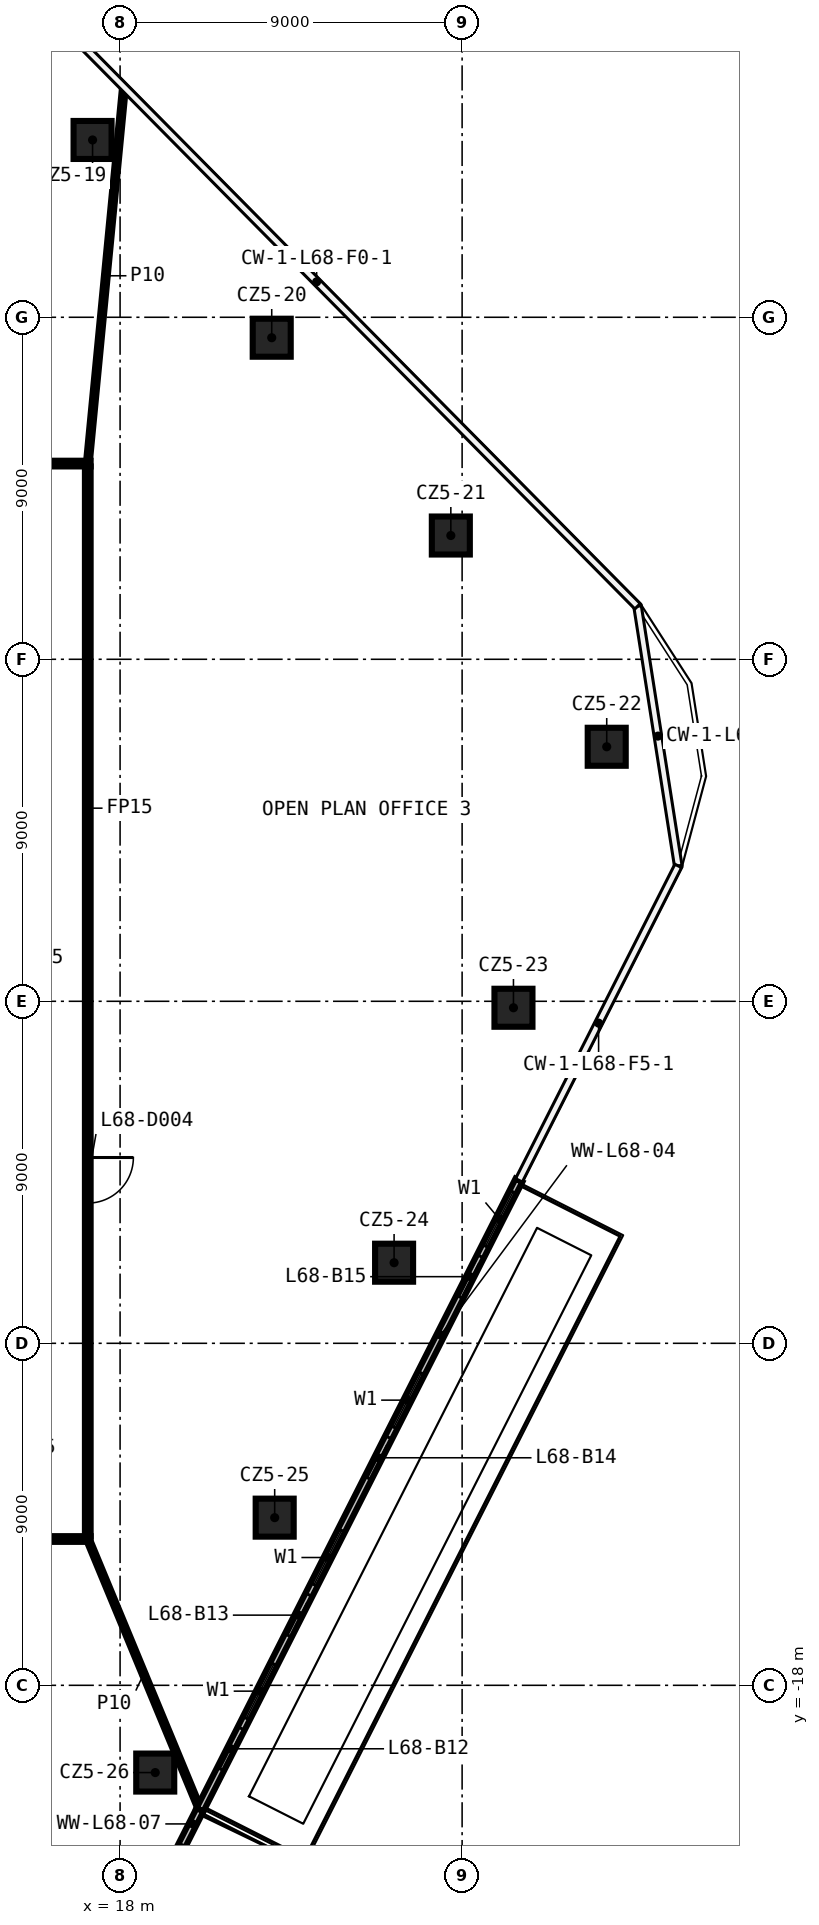
"""IFC4 building model, lengths in metres.
Left out: names, types, materials, properties, quantities, classifications, styles, units other than length and angle.
Written with IfcOpenShell. Run it as: python <this file> out.ifc"""

import sys

from ifc_helpers import new_model, si_unit, direction, frame, frame_2d, origin, origin_2d, place, context, subcontext, project, spatial, rectangle, extrude, element, fill, save


model = new_model("IFC4")
c1 = context("Model", 3, precision=1e-05, world=origin(), true_north=direction((0.0, 1.0)))
c2 = subcontext(c1, "Body", "Model", "MODEL_VIEW")
j1 = project(units=[si_unit("LENGTHUNIT", "METRE"), si_unit("PLANEANGLEUNIT", "RADIAN")], contexts=[c1])
p1 = place(None, origin())
s1 = spatial("IfcSite", under=j1, at=p1, CompositionType="ELEMENT")
p2 = place(p1, origin())
s2 = spatial("IfcBuilding", under=s1, at=p2, CompositionType="ELEMENT")
p3 = place(p2, frame((0.0, 0.0, 319.4)))
s3 = spatial("IfcBuildingStorey", under=s2, at=p3, CompositionType="ELEMENT", Elevation=319.4)
for number, where, z_axis, x_axis in (
    (1, (17.276, 22.666, 0.0), (0.0, 0.0, 1.0), (1.0, 0.0, 0.0)),
    (2, (21.99, 17.462, 0.0), (0.0, 0.0, 1.0), (1.0, 0.0, 0.0)),
    (3, (26.703, 12.257, 0.0), (0.0, 0.0, 1.0), (1.0, 0.0, 0.0)),
    (4, (30.805, 6.698, 0.0), (0.0, 0.0, 1.0), (1.0, 0.0, 0.0)),
    (5, (28.351, -0.17, 0.0), (0.0, 0.0, 1.0), (1.0, 0.0, 0.0)),
    (6, (25.21, -6.879, 0.0), (0.0, 0.0, 1.0), (1.0, 0.0, 0.0)),
    (7, (22.068, -13.588, 0.0), (0.0, 0.0, 1.0), (1.0, 0.0, 0.0)),
    (8, (18.925, -20.296, 0.0), (0.0, 0.0, 1.0), (1.0, 0.0, 0.0)),
):
    element("IfcColumn", number, at=place(p3, frame(where, z_axis=z_axis, x_axis=x_axis)), inside=s3, PredefinedType="COLUMN", context=c2, shape_type="SweptSolid", body=[
        extrude(rectangle(XDim=1.0, YDim=1.0, at=origin_2d()), origin(), (0.0, 0.0, 1.0), 3.82),
    ])
p4 = place(p3, frame((17.225, -14.15, 0.0), z_axis=(0.0, 0.0, 1.0), x_axis=(-1.0, 0.0, 0.0)))
e9 = element("IfcWall", 9, at=p4, inside=s3, PredefinedType="PARTITIONING", context=c2, shape_type="SweptSolid", body=[
    extrude(rectangle(XDim=34.45, YDim=0.15, at=frame_2d((17.225, 0.0))), origin(), (0.0, 0.0, 1.0), 3.82),
])
p5 = place(p4, frame((17.711, 0.0, 0.0)))
e10 = element("IfcOpeningElement", 10, at=p5, cuts=e9, PredefinedType="OPENING", context=c2, shape_type="SweptSolid", body=[
    extrude(rectangle(XDim=1.2, YDim=2.1, at=frame_2d((0.6, 1.05))), frame((0.0, 0.085, 0.0), z_axis=(0.0, -1.0, 0.0), x_axis=(1.0, 0.0, 0.0)), (0.0, 0.0, 1.0), 0.17),
])
p6 = place(p4, frame((4.094, 0.0, 0.0)))
e11 = element("IfcOpeningElement", 11, at=p6, cuts=e9, PredefinedType="OPENING", context=c2, shape_type="SweptSolid", body=[
    extrude(rectangle(XDim=1.2, YDim=2.1, at=frame_2d((0.6, 1.05))), frame((0.0, 0.085, 0.0), z_axis=(0.0, -1.0, 0.0), x_axis=(1.0, 0.0, 0.0)), (0.0, 0.0, 1.0), 0.17),
])
p7 = place(p3, frame((-17.225, 14.15, 0.0), z_axis=(0.0, 0.0, 1.0), x_axis=(1.0, 0.0, 0.0)))
e12 = element("IfcWall", 12, at=p7, inside=s3, PredefinedType="PARTITIONING", context=c2, shape_type="SweptSolid", body=[
    extrude(rectangle(XDim=34.45, YDim=0.15, at=frame_2d((17.225, 0.0))), origin(), (0.0, 0.0, 1.0), 3.82),
])
p8 = place(p7, frame((17.706, 0.0, 0.0)))
e13 = element("IfcOpeningElement", 13, at=p8, cuts=e12, PredefinedType="OPENING", context=c2, shape_type="SweptSolid", body=[
    extrude(rectangle(XDim=1.2, YDim=2.1, at=frame_2d((0.6, 1.05))), frame((0.0, 0.085, 0.0), z_axis=(0.0, -1.0, 0.0), x_axis=(1.0, 0.0, 0.0)), (0.0, 0.0, 1.0), 0.17),
])
p9 = place(p3, frame((17.15, 14.15, 0.0), z_axis=(0.0, 0.0, 1.0), x_axis=(0.095686172631, 0.995411551253, 0.0)))
e14 = element("IfcWall", 14, at=p9, inside=s3, PredefinedType="PARTITIONING", context=c2, shape_type="SweptSolid", body=[
    extrude(rectangle(XDim=9.93, YDim=0.1, at=frame_2d((4.965, 0.0))), origin(), (0.0, 0.0, 1.0), 3.82),
])
p10 = place(p3, frame((17.15, 14.075, 0.0), z_axis=(0.0, 0.0, 1.0), x_axis=(0.0, -1.0, 0.0)))
e15 = element("IfcWall", 15, at=p10, inside=s3, PredefinedType="PARTITIONING", context=c2, shape_type="SweptSolid", body=[
    extrude(rectangle(XDim=28.15, YDim=0.15, at=frame_2d((14.075, 0.0))), origin(), (0.0, 0.0, 1.0), 3.82),
])
p11 = place(p10, frame((18.186, 0.0, 0.0)))
e16 = element("IfcOpeningElement", 16, at=p11, cuts=e15, PredefinedType="OPENING", context=c2, shape_type="SweptSolid", body=[
    extrude(rectangle(XDim=1.2, YDim=2.1, at=frame_2d((0.6, 1.05))), frame((0.0, 0.085, 0.0), z_axis=(0.0, -1.0, 0.0), x_axis=(1.0, 0.0, 0.0)), (0.0, 0.0, 1.0), 0.17),
])
p12 = place(p3, frame((17.15, -14.15, 0.0), z_axis=(0.0, 0.0, 1.0), x_axis=(0.382693080748, -0.923875535961, 0.0)))
e17 = element("IfcWall", 17, at=p12, inside=s3, PredefinedType="PARTITIONING", context=c2, shape_type="SweptSolid", body=[
    extrude(rectangle(XDim=7.687, YDim=0.1, at=frame_2d((3.843, 0.0))), origin(), (0.0, 0.0, 1.0), 3.82),
])
p13 = place(p3, frame((20.102, -21.276, 0.0), z_axis=(0.0, 0.0, 1.0), x_axis=(0.451966467013, 0.892034927957, 0.0)))
e18 = element("IfcWall", 18, at=p13, inside=s3, PredefinedType="SOLIDWALL", context=c2, shape_type="SweptSolid", body=[
    extrude(rectangle(XDim=18.57, YDim=0.2, at=frame_2d((9.285, 0.0))), origin(), (0.0, 0.0, 1.0), 3.82),
])
p14 = place(p13, frame((2.7, 0.0, 0.6)))
e19 = element("IfcOpeningElement", 19, at=p14, cuts=e18, PredefinedType="OPENING", context=c2, shape_type="SweptSolid", body=[
    extrude(rectangle(XDim=1.6, YDim=2.4, at=frame_2d((0.8, 1.2))), frame((0.0, 0.11, 0.0), z_axis=(0.0, -1.0, 0.0), x_axis=(1.0, 0.0, 0.0)), (0.0, 0.0, 1.0), 0.22),
])
p15 = place(p13, frame((1.2, 0.0, 0.0)))
e20 = element("IfcOpeningElement", 20, at=p15, cuts=e18, PredefinedType="OPENING", context=c2, shape_type="SweptSolid", body=[
    extrude(rectangle(XDim=1.2, YDim=2.4, at=frame_2d((0.6, 1.2))), frame((0.0, 0.11, 0.0), z_axis=(0.0, -1.0, 0.0), x_axis=(1.0, 0.0, 0.0)), (0.0, 0.0, 1.0), 0.22),
])
p16 = place(p13, frame((6.643, 0.0, 0.6)))
e21 = element("IfcOpeningElement", 21, at=p16, cuts=e18, PredefinedType="OPENING", context=c2, shape_type="SweptSolid", body=[
    extrude(rectangle(XDim=1.6, YDim=2.4, at=frame_2d((0.8, 1.2))), frame((0.0, 0.11, 0.0), z_axis=(0.0, -1.0, 0.0), x_axis=(1.0, 0.0, 0.0)), (0.0, 0.0, 1.0), 0.22),
])
p17 = place(p13, frame((5.143, 0.0, 0.0)))
e22 = element("IfcOpeningElement", 22, at=p17, cuts=e18, PredefinedType="OPENING", context=c2, shape_type="SweptSolid", body=[
    extrude(rectangle(XDim=1.2, YDim=2.4, at=frame_2d((0.6, 1.2))), frame((0.0, 0.11, 0.0), z_axis=(0.0, -1.0, 0.0), x_axis=(1.0, 0.0, 0.0)), (0.0, 0.0, 1.0), 0.22),
])
p18 = place(p13, frame((11.285, 0.0, 0.6)))
e23 = element("IfcOpeningElement", 23, at=p18, cuts=e18, PredefinedType="OPENING", context=c2, shape_type="SweptSolid", body=[
    extrude(rectangle(XDim=1.6, YDim=2.4, at=frame_2d((0.8, 1.2))), frame((0.0, 0.11, 0.0), z_axis=(0.0, -1.0, 0.0), x_axis=(1.0, 0.0, 0.0)), (0.0, 0.0, 1.0), 0.22),
])
p19 = place(p13, frame((9.785, 0.0, 0.0)))
e24 = element("IfcOpeningElement", 24, at=p19, cuts=e18, PredefinedType="OPENING", context=c2, shape_type="SweptSolid", body=[
    extrude(rectangle(XDim=1.2, YDim=2.4, at=frame_2d((0.6, 1.2))), frame((0.0, 0.11, 0.0), z_axis=(0.0, -1.0, 0.0), x_axis=(1.0, 0.0, 0.0)), (0.0, 0.0, 1.0), 0.22),
])
p20 = place(p13, frame((16.627, 0.0, 0.6)))
e25 = element("IfcOpeningElement", 25, at=p20, cuts=e18, PredefinedType="OPENING", context=c2, shape_type="SweptSolid", body=[
    extrude(rectangle(XDim=1.6, YDim=2.4, at=frame_2d((0.8, 1.2))), frame((0.0, 0.11, 0.0), z_axis=(0.0, -1.0, 0.0), x_axis=(1.0, 0.0, 0.0)), (0.0, 0.0, 1.0), 0.22),
])
p21 = place(p13, frame((15.127, 0.0, 0.0)))
e26 = element("IfcOpeningElement", 26, at=p21, cuts=e18, PredefinedType="OPENING", context=c2, shape_type="SweptSolid", body=[
    extrude(rectangle(XDim=1.2, YDim=2.4, at=frame_2d((0.6, 1.2))), frame((0.0, 0.11, 0.0), z_axis=(0.0, -1.0, 0.0), x_axis=(1.0, 0.0, 0.0)), (0.0, 0.0, 1.0), 0.22),
])
p22 = place(p3, frame((18.008, -25.409, 0.0), z_axis=(0.0, 0.0, 1.0), x_axis=(0.451970383378, 0.892032943646, 0.0)))
e27 = element("IfcWall", 27, at=p22, inside=s3, PredefinedType="SOLIDWALL", context=c2, shape_type="SweptSolid", body=[
    extrude(rectangle(XDim=4.634, YDim=0.2, at=frame_2d((2.317, 0.0))), origin(), (0.0, 0.0, 1.0), 3.82),
])
p23 = place(p22, frame((2.0, 0.0, 0.6)))
e28 = element("IfcOpeningElement", 28, at=p23, cuts=e27, PredefinedType="OPENING", context=c2, shape_type="SweptSolid", body=[
    extrude(rectangle(XDim=1.6, YDim=2.4, at=frame_2d((0.8, 1.2))), frame((0.0, 0.11, 0.0), z_axis=(0.0, -1.0, 0.0), x_axis=(1.0, 0.0, 0.0)), (0.0, 0.0, 1.0), 0.22),
])
p24 = place(p22, frame((0.5, 0.0, 0.0)))
e29 = element("IfcOpeningElement", 29, at=p24, cuts=e27, PredefinedType="OPENING", context=c2, shape_type="SweptSolid", body=[
    extrude(rectangle(XDim=1.2, YDim=2.4, at=frame_2d((0.6, 1.2))), frame((0.0, 0.11, 0.0), z_axis=(0.0, -1.0, 0.0), x_axis=(1.0, 0.0, 0.0)), (0.0, 0.0, 1.0), 0.22),
])
p25 = place(p11, origin())
e30 = element("IfcDoor", 30, at=p25, inside=s3, OperationType="SINGLE_SWING_LEFT", PredefinedType="DOOR", context=c2, shape_type="SweptSolid", body=[
    extrude(rectangle(XDim=1.2, YDim=2.1, at=frame_2d((0.6, 1.05))), frame((0.0, 0.025, 0.0), z_axis=(0.0, -1.0, 0.0), x_axis=(1.0, 0.0, 0.0)), (0.0, 0.0, 1.0), 0.05),
])
fill(e16, e30)
p26 = place(p14, origin())
e31 = element("IfcWindow", 31, at=p26, inside=s3, PartitioningType="SINGLE_PANEL", PredefinedType="WINDOW", context=c2, shape_type="SweptSolid", body=[
    extrude(rectangle(XDim=1.6, YDim=2.4, at=frame_2d((0.8, 1.2))), frame((0.0, 0.03, 0.0), z_axis=(0.0, -1.0, 0.0), x_axis=(1.0, 0.0, 0.0)), (0.0, 0.0, 1.0), 0.06),
])
fill(e19, e31)
p27 = place(p15, origin())
e32 = element("IfcDoor", 32, at=p27, inside=s3, OperationType="SLIDING_TO_LEFT", PredefinedType="DOOR", context=c2, shape_type="SweptSolid", body=[
    extrude(rectangle(XDim=1.2, YDim=2.4, at=frame_2d((0.6, 1.2))), frame((0.0, 0.025, 0.0), z_axis=(0.0, -1.0, 0.0), x_axis=(1.0, 0.0, 0.0)), (0.0, 0.0, 1.0), 0.05),
])
fill(e20, e32)
p28 = place(p16, origin())
e33 = element("IfcWindow", 33, at=p28, inside=s3, PartitioningType="SINGLE_PANEL", PredefinedType="WINDOW", context=c2, shape_type="SweptSolid", body=[
    extrude(rectangle(XDim=1.6, YDim=2.4, at=frame_2d((0.8, 1.2))), frame((0.0, 0.03, 0.0), z_axis=(0.0, -1.0, 0.0), x_axis=(1.0, 0.0, 0.0)), (0.0, 0.0, 1.0), 0.06),
])
fill(e21, e33)
p29 = place(p17, origin())
e34 = element("IfcDoor", 34, at=p29, inside=s3, OperationType="SLIDING_TO_LEFT", PredefinedType="DOOR", context=c2, shape_type="SweptSolid", body=[
    extrude(rectangle(XDim=1.2, YDim=2.4, at=frame_2d((0.6, 1.2))), frame((0.0, 0.025, 0.0), z_axis=(0.0, -1.0, 0.0), x_axis=(1.0, 0.0, 0.0)), (0.0, 0.0, 1.0), 0.05),
])
fill(e22, e34)
p30 = place(p18, origin())
e35 = element("IfcWindow", 35, at=p30, inside=s3, PartitioningType="SINGLE_PANEL", PredefinedType="WINDOW", context=c2, shape_type="SweptSolid", body=[
    extrude(rectangle(XDim=1.6, YDim=2.4, at=frame_2d((0.8, 1.2))), frame((0.0, 0.03, 0.0), z_axis=(0.0, -1.0, 0.0), x_axis=(1.0, 0.0, 0.0)), (0.0, 0.0, 1.0), 0.06),
])
fill(e23, e35)
p31 = place(p19, origin())
e36 = element("IfcDoor", 36, at=p31, inside=s3, OperationType="SLIDING_TO_LEFT", PredefinedType="DOOR", context=c2, shape_type="SweptSolid", body=[
    extrude(rectangle(XDim=1.2, YDim=2.4, at=frame_2d((0.6, 1.2))), frame((0.0, 0.025, 0.0), z_axis=(0.0, -1.0, 0.0), x_axis=(1.0, 0.0, 0.0)), (0.0, 0.0, 1.0), 0.05),
])
fill(e24, e36)
p32 = place(p20, origin())
e37 = element("IfcWindow", 37, at=p32, inside=s3, PartitioningType="SINGLE_PANEL", PredefinedType="WINDOW", context=c2, shape_type="SweptSolid", body=[
    extrude(rectangle(XDim=1.6, YDim=2.4, at=frame_2d((0.8, 1.2))), frame((0.0, 0.03, 0.0), z_axis=(0.0, -1.0, 0.0), x_axis=(1.0, 0.0, 0.0)), (0.0, 0.0, 1.0), 0.06),
])
fill(e25, e37)
p33 = place(p21, origin())
e38 = element("IfcDoor", 38, at=p33, inside=s3, OperationType="SLIDING_TO_LEFT", PredefinedType="DOOR", context=c2, shape_type="SweptSolid", body=[
    extrude(rectangle(XDim=1.2, YDim=2.4, at=frame_2d((0.6, 1.2))), frame((0.0, 0.025, 0.0), z_axis=(0.0, -1.0, 0.0), x_axis=(1.0, 0.0, 0.0)), (0.0, 0.0, 1.0), 0.05),
])
fill(e26, e38)
p34 = place(p23, origin())
e39 = element("IfcWindow", 39, at=p34, inside=s3, PartitioningType="SINGLE_PANEL", PredefinedType="WINDOW", context=c2, shape_type="SweptSolid", body=[
    extrude(rectangle(XDim=1.6, YDim=2.4, at=frame_2d((0.8, 1.2))), frame((0.0, 0.03, 0.0), z_axis=(0.0, -1.0, 0.0), x_axis=(1.0, 0.0, 0.0)), (0.0, 0.0, 1.0), 0.06),
])
fill(e28, e39)
save(model, sys.argv[1])
